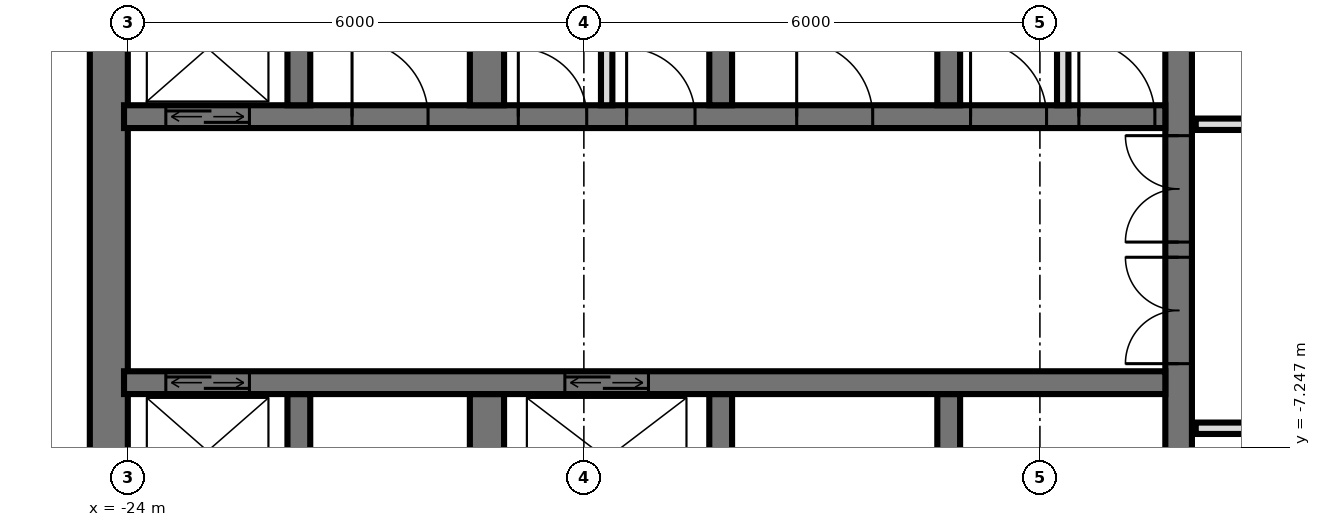
"""IFC4 building model, lengths in metres.
Left out: names, types, materials, properties, quantities, classifications, styles, units other than length and angle.
Written with IfcOpenShell. Run it as: python <this file> out.ifc"""

import sys

from ifc_helpers import new_model, si_unit, direction, frame, frame_2d, origin, place, context, subcontext, project, spatial, rectangle, extrude, element, fill, save


model = new_model("IFC4")
c1 = context("Model", 3, precision=1e-05, world=origin(), true_north=direction((0.0, 1.0)))
c2 = subcontext(c1, "Body", "Model", "MODEL_VIEW")
j1 = project(units=[si_unit("LENGTHUNIT", "METRE"), si_unit("PLANEANGLEUNIT", "RADIAN")], contexts=[c1])
p1 = place(None, origin())
s1 = spatial("IfcSite", under=j1, at=p1, CompositionType="ELEMENT")
p2 = place(p1, origin())
s2 = spatial("IfcBuilding", under=s1, at=p2, CompositionType="ELEMENT")
p3 = place(p2, frame((0.0, 0.0, 116.4)))
s3 = spatial("IfcBuildingStorey", under=s2, at=p3, CompositionType="ELEMENT", Elevation=116.4)
p4 = place(p3, frame((-10.175, -14.55, 0.0), z_axis=(0.0, 0.0, 1.0), x_axis=(0.0, 1.0, 0.0)))
e1 = element("IfcWall", 1, at=p4, inside=s3, PredefinedType="SHEAR", context=c2, shape_type="SweptSolid", body=[
    extrude(rectangle(XDim=14.1, YDim=0.35, at=frame_2d((7.05, 0.0))), origin(), (0.0, 0.0, 1.0), 3.6),
])
p5 = place(p4, frame((8.4, 0.0, 0.0)))
e2 = element("IfcOpeningElement", 2, at=p5, cuts=e1, PredefinedType="OPENING", context=c2, shape_type="SweptSolid", body=[
    extrude(rectangle(XDim=1.4, YDim=2.4, at=frame_2d((0.7, 1.2))), frame((0.0, 0.185, 0.0), z_axis=(0.0, -1.0, 0.0), x_axis=(1.0, 0.0, 0.0)), (0.0, 0.0, 1.0), 0.37),
])
p6 = place(p4, frame((10.0, 0.0, 0.0)))
e3 = element("IfcOpeningElement", 3, at=p6, cuts=e1, PredefinedType="OPENING", context=c2, shape_type="SweptSolid", body=[
    extrude(rectangle(XDim=1.4, YDim=2.4, at=frame_2d((0.7, 1.2))), frame((0.0, 0.185, 0.0), z_axis=(0.0, -1.0, 0.0), x_axis=(1.0, 0.0, 0.0)), (0.0, 0.0, 1.0), 0.37),
])
p7 = place(p4, frame((4.0, 0.0, 0.0)))
e4 = element("IfcOpeningElement", 4, at=p7, cuts=e1, PredefinedType="OPENING", context=c2, shape_type="SweptSolid", body=[
    extrude(rectangle(XDim=1.2, YDim=2.1, at=frame_2d((0.6, 1.05))), frame((0.0, 0.185, 0.0), z_axis=(0.0, -1.0, 0.0), x_axis=(1.0, 0.0, 0.0)), (0.0, 0.0, 1.0), 0.37),
])
p8 = place(p3, frame((-24.25, -14.55, 0.0), z_axis=(0.0, 0.0, 1.0), x_axis=(0.0, 1.0, 0.0)))
e5 = element("IfcWall", 5, at=p8, inside=s3, PredefinedType="SHEAR", context=c2, shape_type="SweptSolid", body=[
    extrude(rectangle(XDim=14.1, YDim=0.5, at=frame_2d((7.05, 0.0))), origin(), (0.0, 0.0, 1.0), 3.6),
])
p9 = place(p3, frame((-24.05, -2.9, 0.0), z_axis=(0.0, 0.0, 1.0), x_axis=(1.0, 0.0, 0.0)))
e6 = element("IfcWall", 6, at=p9, inside=s3, PredefinedType="SHEAR", context=c2, shape_type="SweptSolid", body=[
    extrude(rectangle(XDim=13.7, YDim=0.3, at=frame_2d((6.85, 0.0))), origin(), (0.0, 0.0, 1.0), 3.6),
])
p10 = place(p9, frame((0.55, 0.0, 0.0)))
e7 = element("IfcOpeningElement", 7, at=p10, cuts=e6, PredefinedType="OPENING", context=c2, shape_type="SweptSolid", body=[
    extrude(rectangle(XDim=1.1, YDim=2.1, at=frame_2d((0.55, 1.05))), frame((0.0, 0.16, 0.0), z_axis=(0.0, -1.0, 0.0), x_axis=(1.0, 0.0, 0.0)), (0.0, 0.0, 1.0), 0.32),
])
p11 = place(p9, frame((6.613, 0.0, 0.0)))
e8 = element("IfcOpeningElement", 8, at=p11, cuts=e6, PredefinedType="OPENING", context=c2, shape_type="SweptSolid", body=[
    extrude(rectangle(XDim=0.9, YDim=2.1, at=frame_2d((0.45, 1.05))), frame((0.0, 0.16, 0.0), z_axis=(0.0, -1.0, 0.0), x_axis=(1.0, 0.0, 0.0)), (0.0, 0.0, 1.0), 0.32),
])
p12 = place(p9, frame((5.188, 0.0, 0.0)))
e9 = element("IfcOpeningElement", 9, at=p12, cuts=e6, PredefinedType="OPENING", context=c2, shape_type="SweptSolid", body=[
    extrude(rectangle(XDim=0.9, YDim=2.1, at=frame_2d((0.45, 1.05))), frame((0.0, 0.16, 0.0), z_axis=(0.0, -1.0, 0.0), x_axis=(1.0, 0.0, 0.0)), (0.0, 0.0, 1.0), 0.32),
])
p13 = place(p9, frame((12.562, 0.0, 0.0)))
e10 = element("IfcOpeningElement", 10, at=p13, cuts=e6, PredefinedType="OPENING", context=c2, shape_type="SweptSolid", body=[
    extrude(rectangle(XDim=1.0, YDim=2.1, at=frame_2d((0.5, 1.05))), frame((0.0, 0.16, 0.0), z_axis=(0.0, -1.0, 0.0), x_axis=(1.0, 0.0, 0.0)), (0.0, 0.0, 1.0), 0.32),
])
p14 = place(p9, frame((11.137, 0.0, 0.0)))
e11 = element("IfcOpeningElement", 11, at=p14, cuts=e6, PredefinedType="OPENING", context=c2, shape_type="SweptSolid", body=[
    extrude(rectangle(XDim=1.0, YDim=2.1, at=frame_2d((0.5, 1.05))), frame((0.0, 0.16, 0.0), z_axis=(0.0, -1.0, 0.0), x_axis=(1.0, 0.0, 0.0)), (0.0, 0.0, 1.0), 0.32),
])
p15 = place(p9, frame((8.85, 0.0, 0.0)))
e12 = element("IfcOpeningElement", 12, at=p15, cuts=e6, PredefinedType="OPENING", context=c2, shape_type="SweptSolid", body=[
    extrude(rectangle(XDim=1.0, YDim=2.1, at=frame_2d((0.5, 1.05))), frame((0.0, 0.16, 0.0), z_axis=(0.0, -1.0, 0.0), x_axis=(1.0, 0.0, 0.0)), (0.0, 0.0, 1.0), 0.32),
])
p16 = place(p9, frame((3.0, 0.0, 0.0)))
e13 = element("IfcOpeningElement", 13, at=p16, cuts=e6, PredefinedType="OPENING", context=c2, shape_type="SweptSolid", body=[
    extrude(rectangle(XDim=1.0, YDim=2.1, at=frame_2d((0.5, 1.05))), frame((0.0, 0.16, 0.0), z_axis=(0.0, -1.0, 0.0), x_axis=(1.0, 0.0, 0.0)), (0.0, 0.0, 1.0), 0.32),
])
p17 = place(p3, frame((-24.05, -6.4, 0.0), z_axis=(0.0, 0.0, 1.0), x_axis=(1.0, 0.0, 0.0)))
e14 = element("IfcWall", 14, at=p17, inside=s3, PredefinedType="SHEAR", context=c2, shape_type="SweptSolid", body=[
    extrude(rectangle(XDim=13.7, YDim=0.3, at=frame_2d((6.85, 0.0))), origin(), (0.0, 0.0, 1.0), 3.6),
])
p18 = place(p17, frame((0.55, 0.0, 0.0)))
e15 = element("IfcOpeningElement", 15, at=p18, cuts=e14, PredefinedType="OPENING", context=c2, shape_type="SweptSolid", body=[
    extrude(rectangle(XDim=1.1, YDim=2.1, at=frame_2d((0.55, 1.05))), frame((0.0, 0.16, 0.0), z_axis=(0.0, -1.0, 0.0), x_axis=(1.0, 0.0, 0.0)), (0.0, 0.0, 1.0), 0.32),
])
p19 = place(p17, frame((5.8, 0.0, 0.0)))
e16 = element("IfcOpeningElement", 16, at=p19, cuts=e14, PredefinedType="OPENING", context=c2, shape_type="SweptSolid", body=[
    extrude(rectangle(XDim=1.1, YDim=2.1, at=frame_2d((0.55, 1.05))), frame((0.0, 0.16, 0.0), z_axis=(0.0, -1.0, 0.0), x_axis=(1.0, 0.0, 0.0)), (0.0, 0.0, 1.0), 0.32),
])
for number, where, z_axis, x_axis in (
    (17, (-13.2, -2.75, 0.0), (0.0, 0.0, 1.0), (0.0, 1.0, 0.0)),
    (18, (-13.2, -8.85, 0.0), (0.0, 0.0, 1.0), (0.0, 1.0, 0.0)),
    (19, (-16.2, -2.75, 0.0), (0.0, 0.0, 1.0), (0.0, 1.0, 0.0)),
    (20, (-16.2, -8.85, 0.0), (0.0, 0.0, 1.0), (0.0, 1.0, 0.0)),
):
    element("IfcWall", number, at=place(p3, frame(where, z_axis=z_axis, x_axis=x_axis)), inside=s3, PredefinedType="SHEAR", context=c2, shape_type="SweptSolid", body=[
        extrude(rectangle(XDim=2.3, YDim=0.3, at=frame_2d((1.15, 0.0))), origin(), (0.0, 0.0, 1.0), 3.6),
    ])
for number, where, z_axis, x_axis in (
    (21, (-19.275, -2.75, 0.0), (0.0, 0.0, 1.0), (0.0, 1.0, 0.0)),
    (22, (-19.275, -8.85, 0.0), (0.0, 0.0, 1.0), (0.0, 1.0, 0.0)),
):
    element("IfcWall", number, at=place(p3, frame(where, z_axis=z_axis, x_axis=x_axis)), inside=s3, PredefinedType="SHEAR", context=c2, shape_type="SweptSolid", body=[
        extrude(rectangle(XDim=2.3, YDim=0.45, at=frame_2d((1.15, 0.0))), origin(), (0.0, 0.0, 1.0), 3.6),
    ])
for number, where, z_axis, x_axis in (
    (23, (-21.75, -2.75, 0.0), (0.0, 0.0, 1.0), (0.0, 1.0, 0.0)),
    (24, (-21.75, -8.85, 0.0), (0.0, 0.0, 1.0), (0.0, 1.0, 0.0)),
):
    element("IfcWall", number, at=place(p3, frame(where, z_axis=z_axis, x_axis=x_axis)), inside=s3, PredefinedType="SHEAR", context=c2, shape_type="SweptSolid", body=[
        extrude(rectangle(XDim=2.3, YDim=0.3, at=frame_2d((1.15, 0.0))), origin(), (0.0, 0.0, 1.0), 3.6),
    ])
for number, where, z_axis, x_axis in (
    (25, (-17.7, -2.75, 0.0), (0.0, 0.0, 1.0), (0.0, 1.0, 0.0)),
    (26, (-11.7, -2.75, 0.0), (0.0, 0.0, 1.0), (0.0, 1.0, 0.0)),
):
    element("IfcWall", number, at=place(p3, frame(where, z_axis=z_axis, x_axis=x_axis)), inside=s3, PredefinedType="PARTITIONING", context=c2, shape_type="SweptSolid", body=[
        extrude(rectangle(XDim=2.3, YDim=0.15, at=frame_2d((1.15, 0.0))), origin(), (0.0, 0.0, 1.0), 3.3),
    ])
p20 = place(p3, frame((-9.95, -7.0, 0.0), z_axis=(0.0, 0.0, 1.0), x_axis=(1.0, 0.0, 0.0)))
e27 = element("IfcWall", 27, at=p20, inside=s3, PredefinedType="PARTITIONING", context=c2, shape_type="SweptSolid", body=[
    extrude(rectangle(XDim=19.9, YDim=0.15, at=frame_2d((9.95, 0.0))), origin(), (0.0, 0.0, 1.0), 3.32),
])
p21 = place(p20, frame((9.45, 0.0, 0.0)))
e28 = element("IfcOpeningElement", 28, at=p21, cuts=e27, PredefinedType="OPENING", context=c2, shape_type="SweptSolid", body=[
    extrude(rectangle(XDim=1.0, YDim=2.1, at=frame_2d((0.5, 1.05))), frame((0.0, 0.085, 0.0), z_axis=(0.0, -1.0, 0.0), x_axis=(1.0, 0.0, 0.0)), (0.0, 0.0, 1.0), 0.17),
])
p22 = place(p20, frame((3.45, 0.0, 0.0)))
e29 = element("IfcOpeningElement", 29, at=p22, cuts=e27, PredefinedType="OPENING", context=c2, shape_type="SweptSolid", body=[
    extrude(rectangle(XDim=1.0, YDim=2.1, at=frame_2d((0.5, 1.05))), frame((0.0, 0.085, 0.0), z_axis=(0.0, -1.0, 0.0), x_axis=(1.0, 0.0, 0.0)), (0.0, 0.0, 1.0), 0.17),
])
p23 = place(p3, frame((-9.95, -3.0, 0.0), z_axis=(0.0, 0.0, 1.0), x_axis=(1.0, 0.0, 0.0)))
e30 = element("IfcWall", 30, at=p23, inside=s3, PredefinedType="PARTITIONING", context=c2, shape_type="SweptSolid", body=[
    extrude(rectangle(XDim=19.9, YDim=0.15, at=frame_2d((9.95, 0.0))), origin(), (0.0, 0.0, 1.0), 3.32),
])
p24 = place(p23, frame((0.95, 0.0, 0.0)))
e31 = element("IfcOpeningElement", 31, at=p24, cuts=e30, PredefinedType="OPENING", context=c2, shape_type="SweptSolid", body=[
    extrude(rectangle(XDim=1.0, YDim=2.1, at=frame_2d((0.5, 1.05))), frame((0.0, 0.085, 0.0), z_axis=(0.0, -1.0, 0.0), x_axis=(1.0, 0.0, 0.0)), (0.0, 0.0, 1.0), 0.17),
])
p25 = place(p23, frame((3.7, 0.0, 0.0)))
e32 = element("IfcOpeningElement", 32, at=p25, cuts=e30, PredefinedType="OPENING", context=c2, shape_type="SweptSolid", body=[
    extrude(rectangle(XDim=1.0, YDim=2.1, at=frame_2d((0.5, 1.05))), frame((0.0, 0.085, 0.0), z_axis=(0.0, -1.0, 0.0), x_axis=(1.0, 0.0, 0.0)), (0.0, 0.0, 1.0), 0.17),
])
p26 = place(p23, frame((8.45, 0.0, 0.0)))
e33 = element("IfcOpeningElement", 33, at=p26, cuts=e30, PredefinedType="OPENING", context=c2, shape_type="SweptSolid", body=[
    extrude(rectangle(XDim=1.0, YDim=2.1, at=frame_2d((0.5, 1.05))), frame((0.0, 0.085, 0.0), z_axis=(0.0, -1.0, 0.0), x_axis=(1.0, 0.0, 0.0)), (0.0, 0.0, 1.0), 0.17),
])
p27 = place(p23, frame((15.7, 0.0, 0.0)))
e34 = element("IfcOpeningElement", 34, at=p27, cuts=e30, PredefinedType="OPENING", context=c2, shape_type="SweptSolid", body=[
    extrude(rectangle(XDim=1.0, YDim=2.1, at=frame_2d((0.5, 1.05))), frame((0.0, 0.085, 0.0), z_axis=(0.0, -1.0, 0.0), x_axis=(1.0, 0.0, 0.0)), (0.0, 0.0, 1.0), 0.17),
])
p28 = place(p10, origin())
e35 = element("IfcDoor", 35, at=p28, inside=s3, OperationType="DOUBLE_DOOR_SLIDING", PredefinedType="USERDEFINED", context=c2, shape_type="SweptSolid", body=[
    extrude(rectangle(XDim=1.1, YDim=2.1, at=frame_2d((0.55, 1.05))), frame((0.0, 0.025, 0.0), z_axis=(0.0, -1.0, 0.0), x_axis=(1.0, 0.0, 0.0)), (0.0, 0.0, 1.0), 0.05),
])
fill(e7, e35)
p29 = place(p18, origin())
e36 = element("IfcDoor", 36, at=p29, inside=s3, OperationType="DOUBLE_DOOR_SLIDING", PredefinedType="USERDEFINED", context=c2, shape_type="SweptSolid", body=[
    extrude(rectangle(XDim=1.1, YDim=2.1, at=frame_2d((0.55, 1.05))), frame((0.0, 0.025, 0.0), z_axis=(0.0, -1.0, 0.0), x_axis=(1.0, 0.0, 0.0)), (0.0, 0.0, 1.0), 0.05),
])
fill(e15, e36)
p30 = place(p19, origin())
e37 = element("IfcDoor", 37, at=p30, inside=s3, OperationType="DOUBLE_DOOR_SLIDING", PredefinedType="USERDEFINED", context=c2, shape_type="SweptSolid", body=[
    extrude(rectangle(XDim=1.1, YDim=2.1, at=frame_2d((0.55, 1.05))), frame((0.0, 0.025, 0.0), z_axis=(0.0, -1.0, 0.0), x_axis=(1.0, 0.0, 0.0)), (0.0, 0.0, 1.0), 0.05),
])
fill(e16, e37)
p31 = place(p5, origin())
e38 = element("IfcDoor", 38, at=p31, inside=s3, OperationType="DOUBLE_DOOR_SINGLE_SWING", PredefinedType="DOOR", context=c2, shape_type="SweptSolid", body=[
    extrude(rectangle(XDim=1.4, YDim=2.4, at=frame_2d((0.7, 1.2))), frame((0.0, 0.025, 0.0), z_axis=(0.0, -1.0, 0.0), x_axis=(1.0, 0.0, 0.0)), (0.0, 0.0, 1.0), 0.05),
])
fill(e2, e38)
p32 = place(p6, origin())
e39 = element("IfcDoor", 39, at=p32, inside=s3, OperationType="DOUBLE_DOOR_SINGLE_SWING", PredefinedType="DOOR", context=c2, shape_type="SweptSolid", body=[
    extrude(rectangle(XDim=1.4, YDim=2.4, at=frame_2d((0.7, 1.2))), frame((0.0, 0.025, 0.0), z_axis=(0.0, -1.0, 0.0), x_axis=(1.0, 0.0, 0.0)), (0.0, 0.0, 1.0), 0.05),
])
fill(e3, e39)
p33 = place(p11, origin())
e40 = element("IfcDoor", 40, at=p33, inside=s3, OperationType="SINGLE_SWING_RIGHT", PredefinedType="DOOR", context=c2, shape_type="SweptSolid", body=[
    extrude(rectangle(XDim=0.9, YDim=2.1, at=frame_2d((0.45, 1.05))), frame((0.0, 0.025, 0.0), z_axis=(0.0, -1.0, 0.0), x_axis=(1.0, 0.0, 0.0)), (0.0, 0.0, 1.0), 0.05),
])
fill(e8, e40)
p34 = place(p12, origin())
e41 = element("IfcDoor", 41, at=p34, inside=s3, OperationType="SINGLE_SWING_RIGHT", PredefinedType="DOOR", context=c2, shape_type="SweptSolid", body=[
    extrude(rectangle(XDim=0.9, YDim=2.1, at=frame_2d((0.45, 1.05))), frame((0.0, 0.025, 0.0), z_axis=(0.0, -1.0, 0.0), x_axis=(1.0, 0.0, 0.0)), (0.0, 0.0, 1.0), 0.05),
])
fill(e9, e41)
p35 = place(p13, origin())
e42 = element("IfcDoor", 42, at=p35, inside=s3, OperationType="SINGLE_SWING_RIGHT", PredefinedType="DOOR", context=c2, shape_type="SweptSolid", body=[
    extrude(rectangle(XDim=1.0, YDim=2.1, at=frame_2d((0.5, 1.05))), frame((0.0, 0.025, 0.0), z_axis=(0.0, -1.0, 0.0), x_axis=(1.0, 0.0, 0.0)), (0.0, 0.0, 1.0), 0.05),
])
fill(e10, e42)
p36 = place(p14, origin())
e43 = element("IfcDoor", 43, at=p36, inside=s3, OperationType="SINGLE_SWING_RIGHT", PredefinedType="DOOR", context=c2, shape_type="SweptSolid", body=[
    extrude(rectangle(XDim=1.0, YDim=2.1, at=frame_2d((0.5, 1.05))), frame((0.0, 0.025, 0.0), z_axis=(0.0, -1.0, 0.0), x_axis=(1.0, 0.0, 0.0)), (0.0, 0.0, 1.0), 0.05),
])
fill(e11, e43)
p37 = place(p15, origin())
e44 = element("IfcDoor", 44, at=p37, inside=s3, OperationType="SINGLE_SWING_RIGHT", PredefinedType="DOOR", context=c2, shape_type="SweptSolid", body=[
    extrude(rectangle(XDim=1.0, YDim=2.1, at=frame_2d((0.5, 1.05))), frame((0.0, 0.025, 0.0), z_axis=(0.0, -1.0, 0.0), x_axis=(1.0, 0.0, 0.0)), (0.0, 0.0, 1.0), 0.05),
])
fill(e12, e44)
p38 = place(p16, origin())
e45 = element("IfcDoor", 45, at=p38, inside=s3, OperationType="SINGLE_SWING_RIGHT", PredefinedType="DOOR", context=c2, shape_type="SweptSolid", body=[
    extrude(rectangle(XDim=1.0, YDim=2.1, at=frame_2d((0.5, 1.05))), frame((0.0, 0.025, 0.0), z_axis=(0.0, -1.0, 0.0), x_axis=(1.0, 0.0, 0.0)), (0.0, 0.0, 1.0), 0.05),
])
fill(e13, e45)
save(model, sys.argv[1])
